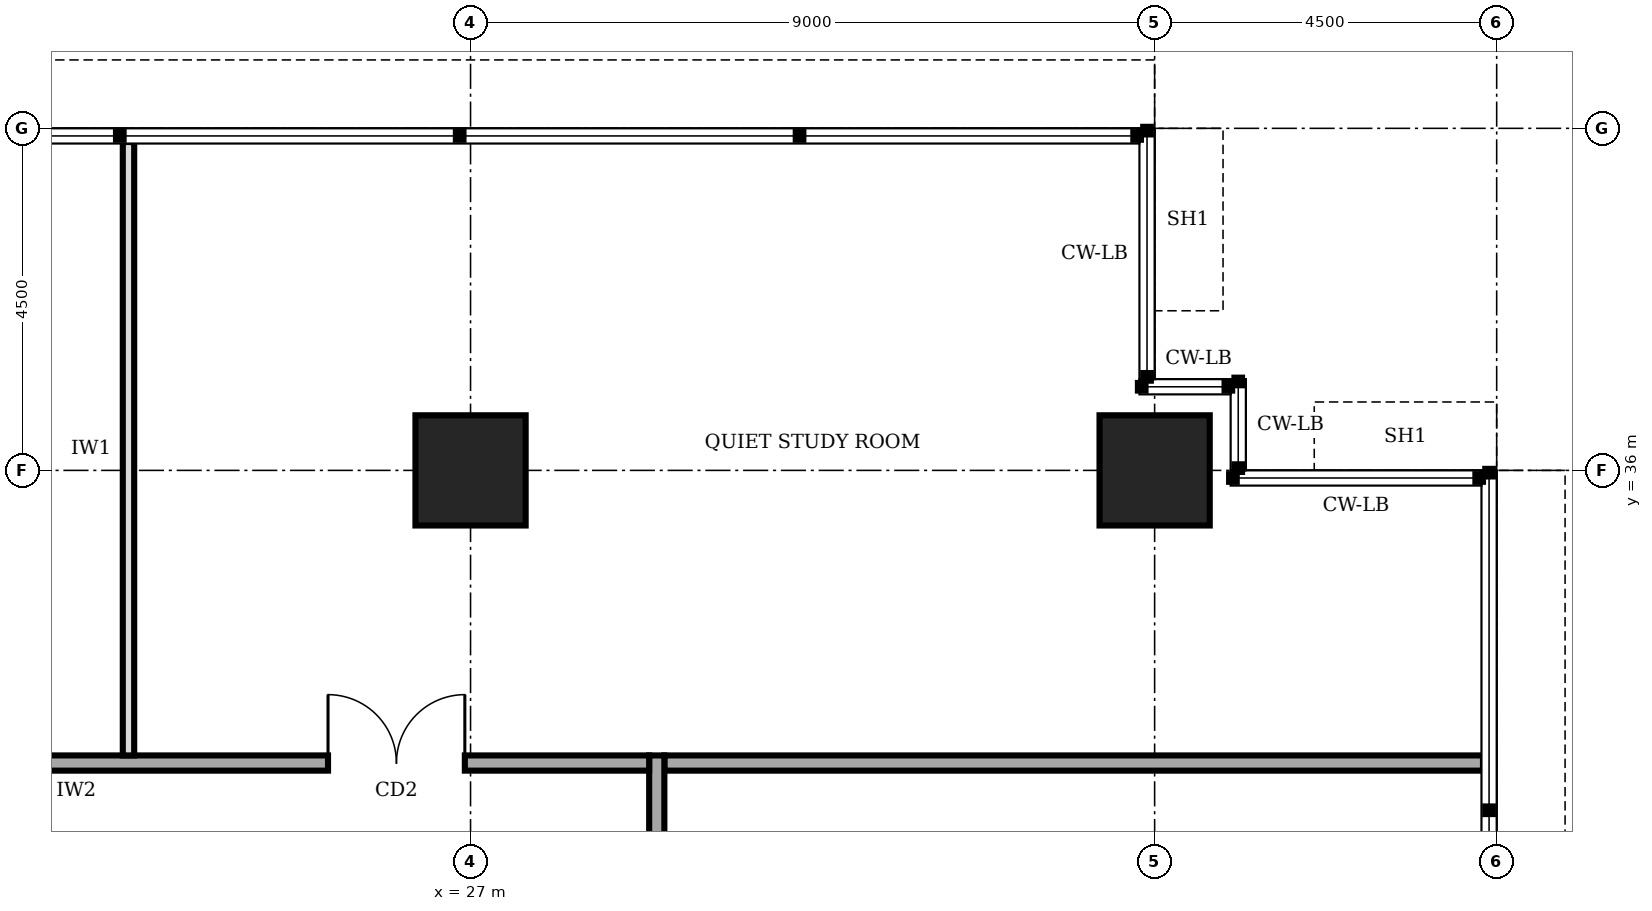
"""IFC4 building model, lengths in metres.
Left out: names, types, materials, properties, quantities, classifications, styles, units other than length and angle.
Written with IfcOpenShell. Run it as: python <this file> out.ifc"""

import sys

from ifc_helpers import new_model, si_unit, direction, frame, frame_2d, origin, origin_2d, place, context, subcontext, project, spatial, rectangle, extrude, element, fill, save


model = new_model("IFC4")
c1 = context("Model", 3, precision=1e-05, world=origin(), true_north=direction((0.0, 1.0)))
c2 = subcontext(c1, "Body", "Model", "MODEL_VIEW")
j1 = project(units=[si_unit("LENGTHUNIT", "METRE"), si_unit("PLANEANGLEUNIT", "RADIAN")], contexts=[c1])
p1 = place(None, origin())
s1 = spatial("IfcSite", under=j1, at=p1, CompositionType="ELEMENT")
p2 = place(p1, origin())
s2 = spatial("IfcBuilding", under=s1, at=p2, CompositionType="ELEMENT")
p3 = place(p2, frame((0.0, 0.0, 269.0)))
s3 = spatial("IfcBuildingStorey", under=s2, at=p3, CompositionType="ELEMENT", Elevation=269.0)
for number, where, z_axis, x_axis in (
    (1, (27.0, 36.0, 0.0), (0.0, 0.0, 1.0), (1.0, 0.0, 0.0)),
    (2, (36.0, 36.0, 0.0), (0.0, 0.0, 1.0), (1.0, 0.0, 0.0)),
):
    element("IfcColumn", number, at=place(p3, frame(where, z_axis=z_axis, x_axis=x_axis)), inside=s3, PredefinedType="COLUMN", context=c2, shape_type="SweptSolid", body=[
        extrude(rectangle(XDim=1.45, YDim=1.45, at=origin_2d()), origin(), (0.0, 0.0, 1.0), 4.0),
    ])
p4 = place(p3, frame((29.45, 8.45, 0.0), z_axis=(0.0, 0.0, 1.0), x_axis=(0.0, 1.0, 0.0)))
e3 = element("IfcWall", 3, at=p4, inside=s3, PredefinedType="SOLIDWALL", context=c2, shape_type="SweptSolid", body=[
    extrude(rectangle(XDim=23.8, YDim=0.2, at=frame_2d((11.9, 0.0))), origin(), (0.0, 0.0, 1.0), 3.75),
])
p5 = place(p4, frame((1.925, 0.0, 0.0)))
e4 = element("IfcOpeningElement", 4, at=p5, cuts=e3, PredefinedType="OPENING", context=c2, shape_type="SweptSolid", body=[
    extrude(rectangle(XDim=1.0, YDim=2.1, at=frame_2d((0.5, 1.05))), frame((0.0, 0.11, 0.0), z_axis=(0.0, -1.0, 0.0), x_axis=(1.0, 0.0, 0.0)), (0.0, 0.0, 1.0), 0.22),
])
p6 = place(p4, frame((6.8, 0.0, 0.0)))
e5 = element("IfcOpeningElement", 5, at=p6, cuts=e3, PredefinedType="OPENING", context=c2, shape_type="SweptSolid", body=[
    extrude(rectangle(XDim=1.0, YDim=2.1, at=frame_2d((0.5, 1.05))), frame((0.0, 0.11, 0.0), z_axis=(0.0, -1.0, 0.0), x_axis=(1.0, 0.0, 0.0)), (0.0, 0.0, 1.0), 0.22),
])
p7 = place(p4, frame((11.3, 0.0, 0.0)))
e6 = element("IfcOpeningElement", 6, at=p7, cuts=e3, PredefinedType="OPENING", context=c2, shape_type="SweptSolid", body=[
    extrude(rectangle(XDim=1.0, YDim=2.1, at=frame_2d((0.5, 1.05))), frame((0.0, 0.11, 0.0), z_axis=(0.0, -1.0, 0.0), x_axis=(1.0, 0.0, 0.0)), (0.0, 0.0, 1.0), 0.22),
])
p8 = place(p4, frame((15.8, 0.0, 0.0)))
e7 = element("IfcOpeningElement", 7, at=p8, cuts=e3, PredefinedType="OPENING", context=c2, shape_type="SweptSolid", body=[
    extrude(rectangle(XDim=1.0, YDim=2.1, at=frame_2d((0.5, 1.05))), frame((0.0, 0.11, 0.0), z_axis=(0.0, -1.0, 0.0), x_axis=(1.0, 0.0, 0.0)), (0.0, 0.0, 1.0), 0.22),
])
p9 = place(p4, frame((20.675, 0.0, 0.0)))
e8 = element("IfcOpeningElement", 8, at=p9, cuts=e3, PredefinedType="OPENING", context=c2, shape_type="SweptSolid", body=[
    extrude(rectangle(XDim=1.0, YDim=2.1, at=frame_2d((0.5, 1.05))), frame((0.0, 0.11, 0.0), z_axis=(0.0, -1.0, 0.0), x_axis=(1.0, 0.0, 0.0)), (0.0, 0.0, 1.0), 0.22),
])
p10 = place(p3, frame((29.35, 32.15, 0.0), z_axis=(0.0, 0.0, 1.0), x_axis=(-1.0, 0.0, 0.0)))
e9 = element("IfcWall", 9, at=p10, inside=s3, PredefinedType="SOLIDWALL", context=c2, shape_type="SweptSolid", body=[
    extrude(rectangle(XDim=17.65, YDim=0.2, at=frame_2d((8.825, 0.0))), origin(), (0.0, 0.0, 1.0), 3.75),
])
p11 = place(p10, frame((16.175, 0.0, 0.0)))
e10 = element("IfcOpeningElement", 10, at=p11, cuts=e9, PredefinedType="OPENING", context=c2, shape_type="SweptSolid", body=[
    extrude(rectangle(XDim=1.0, YDim=2.1, at=frame_2d((0.5, 1.05))), frame((0.0, 0.11, 0.0), z_axis=(0.0, -1.0, 0.0), x_axis=(1.0, 0.0, 0.0)), (0.0, 0.0, 1.0), 0.22),
])
p12 = place(p10, frame((10.85, 0.0, 0.0)))
e11 = element("IfcOpeningElement", 11, at=p12, cuts=e9, PredefinedType="OPENING", context=c2, shape_type="SweptSolid", body=[
    extrude(rectangle(XDim=1.0, YDim=2.1, at=frame_2d((0.5, 1.05))), frame((0.0, 0.11, 0.0), z_axis=(0.0, -1.0, 0.0), x_axis=(1.0, 0.0, 0.0)), (0.0, 0.0, 1.0), 0.22),
])
p13 = place(p10, frame((2.425, 0.0, 0.0)))
e12 = element("IfcOpeningElement", 12, at=p13, cuts=e9, PredefinedType="OPENING", context=c2, shape_type="SweptSolid", body=[
    extrude(rectangle(XDim=1.8, YDim=2.1, at=frame_2d((0.9, 1.05))), frame((0.0, 0.11, 0.0), z_axis=(0.0, -1.0, 0.0), x_axis=(1.0, 0.0, 0.0)), (0.0, 0.0, 1.0), 0.22),
])
p14 = place(p3, frame((29.55, 32.15, 0.0), z_axis=(0.0, 0.0, 1.0), x_axis=(1.0, 0.0, 0.0)))
e13 = element("IfcWall", 13, at=p14, inside=s3, PredefinedType="SOLIDWALL", context=c2, shape_type="SweptSolid", body=[
    extrude(rectangle(XDim=10.77, YDim=0.2, at=frame_2d((5.385, 0.0))), origin(), (0.0, 0.0, 1.0), 3.75),
])
p15 = place(p3, frame((22.5, 32.25, 0.0), z_axis=(0.0, 0.0, 1.0), x_axis=(0.0, 1.0, 0.0)))
e14 = element("IfcWall", 14, at=p15, inside=s3, PredefinedType="PARTITIONING", context=c2, shape_type="SweptSolid", body=[
    extrude(rectangle(XDim=8.07, YDim=0.15, at=frame_2d((4.035, 0.0))), origin(), (0.0, 0.0, 1.0), 3.75),
])
p16 = place(p13, frame((1.8, 0.0, 0.0), z_axis=(0.0, 0.0, 1.0), x_axis=(-1.0, 0.0, 0.0)))
e15 = element("IfcDoor", 15, at=p16, inside=s3, OperationType="DOUBLE_DOOR_SINGLE_SWING", PredefinedType="DOOR", context=c2, shape_type="SweptSolid", body=[
    extrude(rectangle(XDim=1.8, YDim=2.1, at=frame_2d((0.9, 1.05))), frame((0.0, 0.025, 0.0), z_axis=(0.0, -1.0, 0.0), x_axis=(1.0, 0.0, 0.0)), (0.0, 0.0, 1.0), 0.05),
])
fill(e12, e15)
save(model, sys.argv[1])
